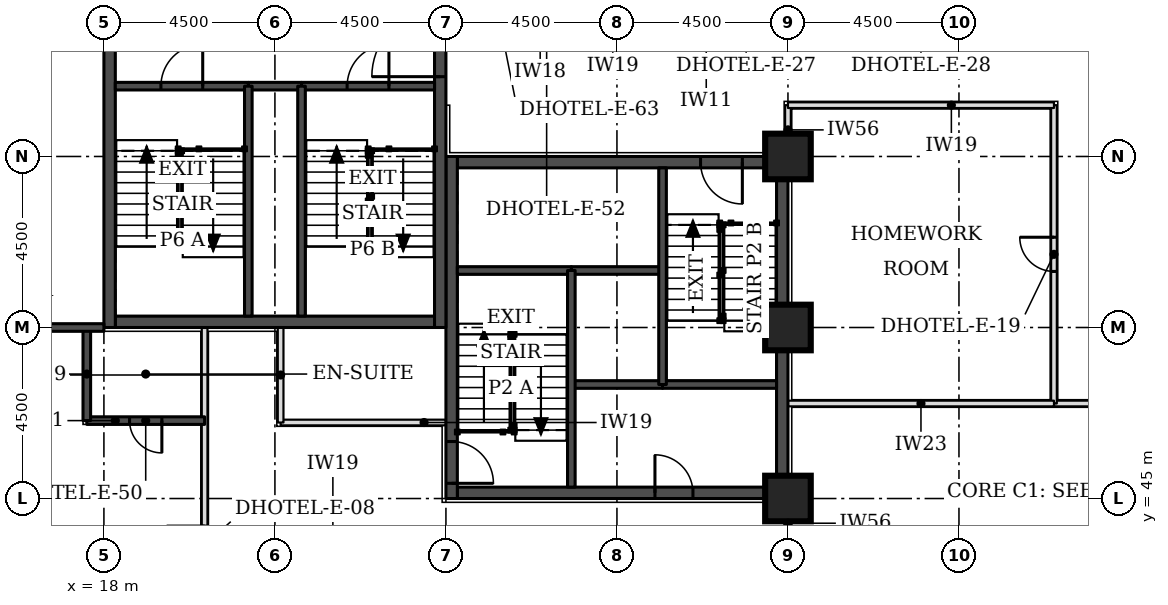
"""IFC4 building model, lengths in metres.
Left out: names, types, materials, properties, quantities, classifications, styles, units other than length and angle.
Written with IfcOpenShell. Run it as: python <this file> out.ifc"""

import sys

from ifc_helpers import new_model, si_unit, direction, frame, frame_2d, origin, origin_2d, place, context, subcontext, project, spatial, rectangle, extrude, element, fill, save


model = new_model("IFC4")
c1 = context("Model", 3, precision=1e-05, world=origin(), true_north=direction((0.0, 1.0)))
c2 = subcontext(c1, "Body", "Model", "MODEL_VIEW")
j1 = project(units=[si_unit("LENGTHUNIT", "METRE"), si_unit("PLANEANGLEUNIT", "RADIAN")], contexts=[c1])
p1 = place(None, origin())
s1 = spatial("IfcSite", under=j1, at=p1, CompositionType="ELEMENT")
p2 = place(p1, origin())
s2 = spatial("IfcBuilding", under=s1, at=p2, CompositionType="ELEMENT")
p3 = place(p2, frame((0.0, 0.0, 62.7)))
s3 = spatial("IfcBuildingStorey", under=s2, at=p3, CompositionType="ELEMENT", Elevation=62.7)
for number, where, z_axis, x_axis in (
    (1, (36.0, 45.0, 0.0), (0.0, 0.0, 1.0), (1.0, 0.0, 0.0)),
    (2, (36.0, 49.5, 0.0), (0.0, 0.0, 1.0), (1.0, 0.0, 0.0)),
    (3, (36.0, 54.0, 0.0), (0.0, 0.0, 1.0), (1.0, 0.0, 0.0)),
):
    element("IfcColumn", number, at=place(p3, frame(where, z_axis=z_axis, x_axis=x_axis)), inside=s3, PredefinedType="COLUMN", context=c2, shape_type="SweptSolid", body=[
        extrude(rectangle(XDim=1.2, YDim=1.2, at=origin_2d()), origin(), (0.0, 0.0, 1.0), 3.3),
    ])
p4 = place(p3, frame((27.3, 45.15, 0.0), z_axis=(0.0, 0.0, 1.0), x_axis=(1.0, 0.0, 0.0)))
e4 = element("IfcWall", 4, at=p4, inside=s3, PredefinedType="SHEAR", context=c2, shape_type="SweptSolid", body=[
    extrude(rectangle(XDim=8.4, YDim=0.3, at=frame_2d((4.2, 0.0))), origin(), (0.0, 0.0, 1.0), 3.3),
])
p5 = place(p4, frame((5.2, 0.0, 0.0)))
e5 = element("IfcOpeningElement", 5, at=p5, cuts=e4, PredefinedType="OPENING", context=c2, shape_type="SweptSolid", body=[
    extrude(rectangle(XDim=1.0, YDim=2.1, at=frame_2d((0.5, 1.05))), frame((0.0, 0.16, 0.0), z_axis=(0.0, -1.0, 0.0), x_axis=(1.0, 0.0, 0.0)), (0.0, 0.0, 1.0), 0.32),
])
p6 = place(p3, frame((27.3, 53.85, 0.0), z_axis=(0.0, 0.0, 1.0), x_axis=(1.0, 0.0, 0.0)))
e6 = element("IfcWall", 6, at=p6, inside=s3, PredefinedType="SHEAR", context=c2, shape_type="SweptSolid", body=[
    extrude(rectangle(XDim=8.4, YDim=0.3, at=frame_2d((4.2, 0.0))), origin(), (0.0, 0.0, 1.0), 3.3),
])
p7 = place(p6, frame((6.4, 0.0, 0.0)))
e7 = element("IfcOpeningElement", 7, at=p7, cuts=e6, PredefinedType="OPENING", context=c2, shape_type="SweptSolid", body=[
    extrude(rectangle(XDim=1.1, YDim=2.1, at=frame_2d((0.55, 1.05))), frame((0.0, 0.16, 0.0), z_axis=(0.0, -1.0, 0.0), x_axis=(1.0, 0.0, 0.0)), (0.0, 0.0, 1.0), 0.32),
])
p8 = place(p3, frame((27.15, 45.0, 0.0), z_axis=(0.0, 0.0, 1.0), x_axis=(0.0, 1.0, 0.0)))
e8 = element("IfcWall", 8, at=p8, inside=s3, PredefinedType="SHEAR", context=c2, shape_type="SweptSolid", body=[
    extrude(rectangle(XDim=9.0, YDim=0.3, at=frame_2d((4.5, 0.0))), origin(), (0.0, 0.0, 1.0), 3.3),
])
p9 = place(p8, frame((0.4, 0.0, 0.0)))
e9 = element("IfcOpeningElement", 9, at=p9, cuts=e8, PredefinedType="OPENING", context=c2, shape_type="SweptSolid", body=[
    extrude(rectangle(XDim=1.1, YDim=2.1, at=frame_2d((0.55, 1.05))), frame((0.0, 0.16, 0.0), z_axis=(0.0, -1.0, 0.0), x_axis=(1.0, 0.0, 0.0)), (0.0, 0.0, 1.0), 0.32),
])
p10 = place(p3, frame((35.85, 45.0, 0.0), z_axis=(0.0, 0.0, 1.0), x_axis=(0.0, 1.0, 0.0)))
e10 = element("IfcWall", 10, at=p10, inside=s3, PredefinedType="SHEAR", context=c2, shape_type="SweptSolid", body=[
    extrude(rectangle(XDim=9.0, YDim=0.3, at=frame_2d((4.5, 0.0))), origin(), (0.0, 0.0, 1.0), 3.3),
])
p11 = place(p3, frame((18.3, 49.65, 0.0), z_axis=(0.0, 0.0, 1.0), x_axis=(1.0, 0.0, 0.0)))
e11 = element("IfcWall", 11, at=p11, inside=s3, PredefinedType="SHEAR", context=c2, shape_type="SweptSolid", body=[
    extrude(rectangle(XDim=8.4, YDim=0.3, at=frame_2d((4.2, 0.0))), origin(), (0.0, 0.0, 1.0), 3.3),
])
p12 = place(p3, frame((18.15, 49.5, 0.0), z_axis=(0.0, 0.0, 1.0), x_axis=(0.0, 1.0, 0.0)))
e12 = element("IfcWall", 12, at=p12, inside=s3, PredefinedType="SHEAR", context=c2, shape_type="SweptSolid", body=[
    extrude(rectangle(XDim=9.0, YDim=0.3, at=frame_2d((4.5, 0.0))), origin(), (0.0, 0.0, 1.0), 3.3),
])
p13 = place(p3, frame((26.85, 49.5, 0.0), z_axis=(0.0, 0.0, 1.0), x_axis=(0.0, 1.0, 0.0)))
e13 = element("IfcWall", 13, at=p13, inside=s3, PredefinedType="SHEAR", context=c2, shape_type="SweptSolid", body=[
    extrude(rectangle(XDim=9.0, YDim=0.3, at=frame_2d((4.5, 0.0))), origin(), (0.0, 0.0, 1.0), 3.3),
])
p14 = place(p13, frame((6.6, 0.0, 0.0)))
e14 = element("IfcOpeningElement", 14, at=p14, cuts=e13, PredefinedType="OPENING", context=c2, shape_type="SweptSolid", body=[
    extrude(rectangle(XDim=1.8, YDim=2.1, at=frame_2d((0.9, 1.05))), frame((0.0, 0.16, 0.0), z_axis=(0.0, -1.0, 0.0), x_axis=(1.0, 0.0, 0.0)), (0.0, 0.0, 1.0), 0.32),
])
p15 = place(p3, frame((20.65, 25.15, 0.0), z_axis=(0.0, 0.0, 1.0), x_axis=(0.0, 1.0, 0.0)))
e15 = element("IfcWall", 15, at=p15, inside=s3, PredefinedType="PARTITIONING", context=c2, shape_type="SweptSolid", body=[
    extrude(rectangle(XDim=24.35, YDim=0.15, at=frame_2d((12.175, 0.0))), origin(), (0.0, 0.0, 1.0), 3.08),
])
p16 = place(p15, frame((0.447, 0.0, 0.0)))
e16 = element("IfcOpeningElement", 16, at=p16, cuts=e15, PredefinedType="OPENING", context=c2, shape_type="SweptSolid", body=[
    extrude(rectangle(XDim=1.0, YDim=2.1, at=frame_2d((0.5, 1.05))), frame((0.0, 0.085, 0.0), z_axis=(0.0, -1.0, 0.0), x_axis=(1.0, 0.0, 0.0)), (0.0, 0.0, 1.0), 0.17),
])
p17 = place(p15, frame((11.825, 0.0, 0.0)))
e17 = element("IfcOpeningElement", 17, at=p17, cuts=e15, PredefinedType="OPENING", context=c2, shape_type="SweptSolid", body=[
    extrude(rectangle(XDim=1.0, YDim=2.1, at=frame_2d((0.5, 1.05))), frame((0.0, 0.085, 0.0), z_axis=(0.0, -1.0, 0.0), x_axis=(1.0, 0.0, 0.0)), (0.0, 0.0, 1.0), 0.17),
])
p18 = place(p15, frame((18.125, 0.0, 0.0)))
e18 = element("IfcOpeningElement", 18, at=p18, cuts=e15, PredefinedType="OPENING", context=c2, shape_type="SweptSolid", body=[
    extrude(rectangle(XDim=1.0, YDim=2.1, at=frame_2d((0.5, 1.05))), frame((0.0, 0.085, 0.0), z_axis=(0.0, -1.0, 0.0), x_axis=(1.0, 0.0, 0.0)), (0.0, 0.0, 1.0), 0.17),
])
p19 = place(p3, frame((36.0, 40.55, 0.0), z_axis=(0.0, 0.0, 1.0), x_axis=(0.0, 1.0, 0.0)))
e19 = element("IfcWall", 19, at=p19, inside=s3, PredefinedType="PARTITIONING", context=c2, shape_type="SweptSolid", body=[
    extrude(rectangle(XDim=4.4, YDim=0.15, at=frame_2d((2.2, 0.0))), origin(), (0.0, 0.0, 1.0), 2.33),
])
p20 = place(p3, frame((22.65, 47.0, 0.0), z_axis=(0.0, 0.0, 1.0), x_axis=(1.0, 0.0, 0.0)))
e20 = element("IfcWall", 20, at=p20, inside=s3, PredefinedType="PARTITIONING", context=c2, shape_type="SweptSolid", body=[
    extrude(rectangle(XDim=4.35, YDim=0.15, at=frame_2d((2.175, 0.0))), origin(), (0.0, 0.0, 1.0), 3.08),
])
p21 = place(p3, frame((22.65, 47.0, 0.0), z_axis=(0.0, 0.0, 1.0), x_axis=(0.0, 1.0, 0.0)))
e21 = element("IfcWall", 21, at=p21, inside=s3, PredefinedType="PARTITIONING", context=c2, shape_type="SweptSolid", body=[
    extrude(rectangle(XDim=2.5, YDim=0.15, at=frame_2d((1.25, 0.0))), origin(), (0.0, 0.0, 1.0), 3.08),
])
p22 = place(p3, frame((43.0, 47.5, 0.0), z_axis=(0.0, 0.0, 1.0), x_axis=(1.0, 0.0, 0.0)))
e22 = element("IfcWall", 22, at=p22, inside=s3, PredefinedType="PARTITIONING", context=c2, shape_type="SweptSolid", body=[
    extrude(rectangle(XDim=4.0, YDim=0.15, at=frame_2d((2.0, 0.0))), origin(), (0.0, 0.0, 1.0), 3.08),
])
p23 = place(p3, frame((43.0, 47.5, 0.0), z_axis=(0.0, 0.0, 1.0), x_axis=(0.0, 1.0, 0.0)))
e23 = element("IfcWall", 23, at=p23, inside=s3, PredefinedType="PARTITIONING", context=c2, shape_type="SweptSolid", body=[
    extrude(rectangle(XDim=7.85, YDim=0.15, at=frame_2d((3.925, 0.0))), origin(), (0.0, 0.0, 1.0), 3.08),
])
p24 = place(p23, frame((3.475, 0.0, 0.0)))
e24 = element("IfcOpeningElement", 24, at=p24, cuts=e23, PredefinedType="OPENING", context=c2, shape_type="SweptSolid", body=[
    extrude(rectangle(XDim=0.9, YDim=2.1, at=frame_2d((0.45, 1.05))), frame((0.0, 0.085, 0.0), z_axis=(0.0, -1.0, 0.0), x_axis=(1.0, 0.0, 0.0)), (0.0, 0.0, 1.0), 0.17),
])
p25 = place(p3, frame((36.0, 54.05, 0.0), z_axis=(0.0, 0.0, 1.0), x_axis=(0.0, 1.0, 0.0)))
e25 = element("IfcWall", 25, at=p25, inside=s3, PredefinedType="PARTITIONING", context=c2, shape_type="SweptSolid", body=[
    extrude(rectangle(XDim=1.3, YDim=0.15, at=frame_2d((0.65, 0.0))), origin(), (0.0, 0.0, 1.0), 2.33),
])
p26 = place(p3, frame((36.0, 55.35, 0.0), z_axis=(0.0, 0.0, 1.0), x_axis=(1.0, 0.0, 0.0)))
e26 = element("IfcWall", 26, at=p26, inside=s3, PredefinedType="PARTITIONING", context=c2, shape_type="SweptSolid", body=[
    extrude(rectangle(XDim=7.0, YDim=0.15, at=frame_2d((3.5, 0.0))), origin(), (0.0, 0.0, 1.0), 3.08),
])
p27 = place(p3, frame((17.55, 47.05, 0.0), z_axis=(0.0, 0.0, 1.0), x_axis=(1.0, 0.0, 0.0)))
e27 = element("IfcWall", 27, at=p27, inside=s3, PredefinedType="SOLIDWALL", context=c2, shape_type="SweptSolid", body=[
    extrude(rectangle(XDim=3.1, YDim=0.2, at=frame_2d((1.55, 0.0))), origin(), (0.0, 0.0, 1.0), 3.08),
])
p28 = place(p27, frame((1.125, 0.0, 0.0)))
e28 = element("IfcOpeningElement", 28, at=p28, cuts=e27, PredefinedType="OPENING", context=c2, shape_type="SweptSolid", body=[
    extrude(rectangle(XDim=0.85, YDim=2.1, at=frame_2d((0.425, 1.05))), frame((0.0, 0.11, 0.0), z_axis=(0.0, -1.0, 0.0), x_axis=(1.0, 0.0, 0.0)), (0.0, 0.0, 1.0), 0.22),
])
p29 = place(p3, frame((17.55, 47.05, 0.0), z_axis=(0.0, 0.0, 1.0), x_axis=(0.0, 1.0, 0.0)))
e29 = element("IfcWall", 29, at=p29, inside=s3, PredefinedType="SOLIDWALL", context=c2, shape_type="SweptSolid", body=[
    extrude(rectangle(XDim=2.45, YDim=0.2, at=frame_2d((1.225, 0.0))), origin(), (0.0, 0.0, 1.0), 3.08),
])
p30 = place(p3, frame((14.1, 49.5, 0.0), z_axis=(0.0, 0.0, 1.0), x_axis=(1.0, 0.0, 0.0)))
e30 = element("IfcWall", 30, at=p30, inside=s3, PredefinedType="SOLIDWALL", context=c2, shape_type="SweptSolid", body=[
    extrude(rectangle(XDim=3.9, YDim=0.2, at=frame_2d((1.95, 0.0))), origin(), (0.0, 0.0, 1.0), 3.08),
])
p31 = place(p3, frame((36.0, 47.5, 0.0), z_axis=(0.0, 0.0, 1.0), x_axis=(1.0, 0.0, 0.0)))
e31 = element("IfcWall", 31, at=p31, inside=s3, PredefinedType="PARTITIONING", context=c2, shape_type="SweptSolid", body=[
    extrude(rectangle(XDim=7.0, YDim=0.15, at=frame_2d((3.5, 0.0))), origin(), (0.0, 0.0, 1.0), 3.08),
])
p32 = place(p3, frame((30.3, 48.0, 0.0), z_axis=(0.0, 0.0, 1.0), x_axis=(1.0, 0.0, 0.0)))
e32 = element("IfcWall", 32, at=p32, inside=s3, PredefinedType="SOLIDWALL", context=c2, shape_type="SweptSolid", body=[
    extrude(rectangle(XDim=2.4, YDim=0.2, at=frame_2d((1.2, 0.0))), origin(), (0.0, 0.0, 1.0), 3.08),
])
p33 = place(p3, frame((32.7, 48.0, 0.0), z_axis=(0.0, 0.0, 1.0), x_axis=(1.0, 0.0, 0.0)))
e33 = element("IfcWall", 33, at=p33, inside=s3, PredefinedType="SOLIDWALL", context=c2, shape_type="SweptSolid", body=[
    extrude(rectangle(XDim=3.0, YDim=0.2, at=frame_2d((1.5, 0.0))), origin(), (0.0, 0.0, 1.0), 3.08),
])
p34 = place(p3, frame((30.3, 51.0, 0.0), z_axis=(0.0, 0.0, 1.0), x_axis=(1.0, 0.0, 0.0)))
e34 = element("IfcWall", 34, at=p34, inside=s3, PredefinedType="SOLIDWALL", context=c2, shape_type="SweptSolid", body=[
    extrude(rectangle(XDim=2.4, YDim=0.2, at=frame_2d((1.2, 0.0))), origin(), (0.0, 0.0, 1.0), 3.3),
])
p35 = place(p3, frame((27.3, 51.0, 0.0), z_axis=(0.0, 0.0, 1.0), x_axis=(1.0, 0.0, 0.0)))
e35 = element("IfcWall", 35, at=p35, inside=s3, PredefinedType="SOLIDWALL", context=c2, shape_type="SweptSolid", body=[
    extrude(rectangle(XDim=3.0, YDim=0.2, at=frame_2d((1.5, 0.0))), origin(), (0.0, 0.0, 1.0), 3.08),
])
for number, where, z_axis, x_axis in (
    (36, (30.3, 45.3, 0.0), (0.0, 0.0, 1.0), (0.0, 1.0, 0.0)),
    (37, (32.7, 48.0, 0.0), (0.0, 0.0, 1.0), (0.0, 1.0, 0.0)),
):
    element("IfcWall", number, at=place(p3, frame(where, z_axis=z_axis, x_axis=x_axis)), inside=s3, PredefinedType="SOLIDWALL", context=c2, shape_type="SweptSolid", body=[
        extrude(rectangle(XDim=5.7, YDim=0.2, at=frame_2d((2.85, 0.0))), origin(), (0.0, 0.0, 1.0), 3.08),
    ])
p36 = place(p3, frame((21.8, 55.85, 0.0), z_axis=(0.0, 0.0, 1.0), x_axis=(1.0, 0.0, 0.0)))
e38 = element("IfcWall", 38, at=p36, inside=s3, PredefinedType="SOLIDWALL", context=c2, shape_type="SweptSolid", body=[
    extrude(rectangle(XDim=1.4, YDim=0.2, at=frame_2d((0.7, 0.0))), origin(), (0.0, 0.0, 1.0), 3.08),
])
p37 = place(p3, frame((18.3, 55.85, 0.0), z_axis=(0.0, 0.0, 1.0), x_axis=(1.0, 0.0, 0.0)))
e39 = element("IfcWall", 39, at=p37, inside=s3, PredefinedType="SOLIDWALL", context=c2, shape_type="SweptSolid", body=[
    extrude(rectangle(XDim=3.5, YDim=0.2, at=frame_2d((1.75, 0.0))), origin(), (0.0, 0.0, 1.0), 3.08),
])
p38 = place(p37, frame((1.2, 0.0, 0.0)))
e40 = element("IfcOpeningElement", 40, at=p38, cuts=e39, PredefinedType="OPENING", context=c2, shape_type="SweptSolid", body=[
    extrude(rectangle(XDim=1.1, YDim=2.1, at=frame_2d((0.55, 1.05))), frame((0.0, 0.11, 0.0), z_axis=(0.0, -1.0, 0.0), x_axis=(1.0, 0.0, 0.0)), (0.0, 0.0, 1.0), 0.22),
])
p39 = place(p3, frame((23.2, 55.85, 0.0), z_axis=(0.0, 0.0, 1.0), x_axis=(1.0, 0.0, 0.0)))
e41 = element("IfcWall", 41, at=p39, inside=s3, PredefinedType="SOLIDWALL", context=c2, shape_type="SweptSolid", body=[
    extrude(rectangle(XDim=3.5, YDim=0.2, at=frame_2d((1.75, 0.0))), origin(), (0.0, 0.0, 1.0), 3.08),
])
p40 = place(p39, frame((1.2, 0.0, 0.0)))
e42 = element("IfcOpeningElement", 42, at=p40, cuts=e41, PredefinedType="OPENING", context=c2, shape_type="SweptSolid", body=[
    extrude(rectangle(XDim=1.1, YDim=2.1, at=frame_2d((0.55, 1.05))), frame((0.0, 0.11, 0.0), z_axis=(0.0, -1.0, 0.0), x_axis=(1.0, 0.0, 0.0)), (0.0, 0.0, 1.0), 0.22),
])
for number, where, z_axis, x_axis in (
    (43, (21.8, 49.8, 0.0), (0.0, 0.0, 1.0), (0.0, 1.0, 0.0)),
    (44, (23.2, 49.8, 0.0), (0.0, 0.0, 1.0), (0.0, 1.0, 0.0)),
):
    element("IfcWall", number, at=place(p3, frame(where, z_axis=z_axis, x_axis=x_axis)), inside=s3, PredefinedType="SOLIDWALL", context=c2, shape_type="SweptSolid", body=[
        extrude(rectangle(XDim=6.05, YDim=0.2, at=frame_2d((3.025, 0.0))), origin(), (0.0, 0.0, 1.0), 3.08),
    ])
p41 = place(p28, frame((0.85, 0.0, 0.0), z_axis=(0.0, 0.0, 1.0), x_axis=(-1.0, 0.0, 0.0)))
e45 = element("IfcDoor", 45, at=p41, inside=s3, OperationType="SINGLE_SWING_LEFT", PredefinedType="DOOR", context=c2, shape_type="SweptSolid", body=[
    extrude(rectangle(XDim=0.85, YDim=2.1, at=frame_2d((0.425, 1.05))), frame((0.0, 0.025, 0.0), z_axis=(0.0, -1.0, 0.0), x_axis=(1.0, 0.0, 0.0)), (0.0, 0.0, 1.0), 0.05),
])
fill(e28, e45)
p42 = place(p24, origin())
e46 = element("IfcDoor", 46, at=p42, inside=s3, OperationType="SINGLE_SWING_RIGHT", PredefinedType="DOOR", context=c2, shape_type="SweptSolid", body=[
    extrude(rectangle(XDim=0.9, YDim=2.1, at=frame_2d((0.45, 1.05))), frame((0.0, 0.025, 0.0), z_axis=(0.0, -1.0, 0.0), x_axis=(1.0, 0.0, 0.0)), (0.0, 0.0, 1.0), 0.05),
])
fill(e24, e46)
p43 = place(p9, frame((1.1, 0.0, 0.0), z_axis=(0.0, 0.0, 1.0), x_axis=(-1.0, 0.0, 0.0)))
e47 = element("IfcDoor", 47, at=p43, inside=s3, OperationType="SINGLE_SWING_RIGHT", PredefinedType="DOOR", context=c2, shape_type="SweptSolid", body=[
    extrude(rectangle(XDim=1.1, YDim=2.1, at=frame_2d((0.55, 1.05))), frame((0.0, 0.025, 0.0), z_axis=(0.0, -1.0, 0.0), x_axis=(1.0, 0.0, 0.0)), (0.0, 0.0, 1.0), 0.05),
])
fill(e9, e47)
p44 = place(p7, frame((1.1, 0.0, 0.0), z_axis=(0.0, 0.0, 1.0), x_axis=(-1.0, 0.0, 0.0)))
e48 = element("IfcDoor", 48, at=p44, inside=s3, OperationType="SINGLE_SWING_LEFT", PredefinedType="DOOR", context=c2, shape_type="SweptSolid", body=[
    extrude(rectangle(XDim=1.1, YDim=2.1, at=frame_2d((0.55, 1.05))), frame((0.0, 0.025, 0.0), z_axis=(0.0, -1.0, 0.0), x_axis=(1.0, 0.0, 0.0)), (0.0, 0.0, 1.0), 0.05),
])
fill(e7, e48)
p45 = place(p5, origin())
e49 = element("IfcDoor", 49, at=p45, inside=s3, OperationType="SINGLE_SWING_LEFT", PredefinedType="DOOR", context=c2, shape_type="SweptSolid", body=[
    extrude(rectangle(XDim=1.0, YDim=2.1, at=frame_2d((0.5, 1.05))), frame((0.0, 0.025, 0.0), z_axis=(0.0, -1.0, 0.0), x_axis=(1.0, 0.0, 0.0)), (0.0, 0.0, 1.0), 0.05),
])
fill(e5, e49)
p46 = place(p38, origin())
e50 = element("IfcDoor", 50, at=p46, inside=s3, OperationType="SINGLE_SWING_RIGHT", PredefinedType="DOOR", context=c2, shape_type="SweptSolid", body=[
    extrude(rectangle(XDim=1.1, YDim=2.1, at=frame_2d((0.55, 1.05))), frame((0.0, 0.025, 0.0), z_axis=(0.0, -1.0, 0.0), x_axis=(1.0, 0.0, 0.0)), (0.0, 0.0, 1.0), 0.05),
])
fill(e40, e50)
p47 = place(p40, origin())
e51 = element("IfcDoor", 51, at=p47, inside=s3, OperationType="SINGLE_SWING_RIGHT", PredefinedType="DOOR", context=c2, shape_type="SweptSolid", body=[
    extrude(rectangle(XDim=1.1, YDim=2.1, at=frame_2d((0.55, 1.05))), frame((0.0, 0.025, 0.0), z_axis=(0.0, -1.0, 0.0), x_axis=(1.0, 0.0, 0.0)), (0.0, 0.0, 1.0), 0.05),
])
fill(e42, e51)
p48 = place(p14, origin())
e52 = element("IfcDoor", 52, at=p48, inside=s3, OperationType="SINGLE_SWING_LEFT", PredefinedType="DOOR", context=c2, shape_type="SweptSolid", body=[
    extrude(rectangle(XDim=1.8, YDim=2.1, at=frame_2d((0.9, 1.05))), frame((0.0, 0.025, 0.0), z_axis=(0.0, -1.0, 0.0), x_axis=(1.0, 0.0, 0.0)), (0.0, 0.0, 1.0), 0.05),
])
fill(e14, e52)
save(model, sys.argv[1])
